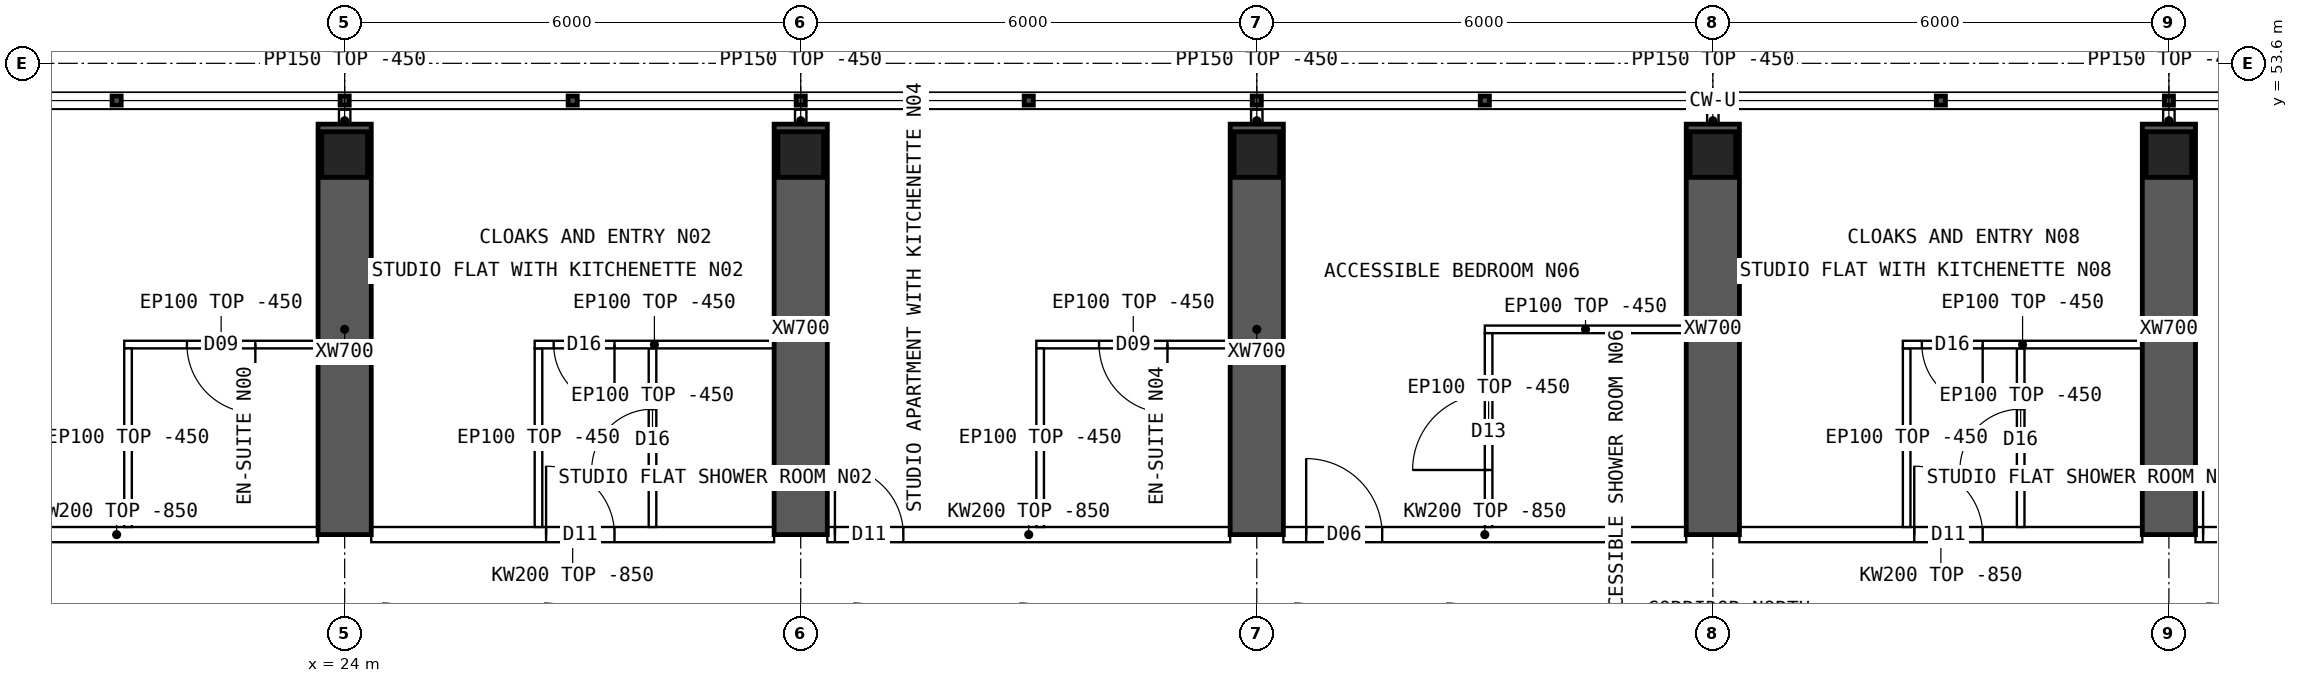
"""IFC4 building model, lengths in metres.
Left out: names, types, materials, properties, quantities, classifications, styles, units other than length and angle.
Written with IfcOpenShell. Run it as: python <this file> out.ifc"""

import sys

from ifc_helpers import new_model, si_unit, direction, frame, frame_2d, origin, origin_2d, place, context, subcontext, project, spatial, polyline, rectangle, hollow_rectangle, outline, extrude, element, fill, save


model = new_model("IFC4")
c1 = context("Model", 3, precision=1e-05, world=origin(), true_north=direction((0.0, 1.0)))
c2 = subcontext(c1, "Body", "Model", "MODEL_VIEW")
j1 = project(units=[si_unit("LENGTHUNIT", "METRE"), si_unit("PLANEANGLEUNIT", "RADIAN")], contexts=[c1])
p1 = place(None, origin())
s1 = spatial("IfcSite", under=j1, at=p1, CompositionType="ELEMENT")
p2 = place(p1, origin())
s2 = spatial("IfcBuilding", under=s1, at=p2, CompositionType="ELEMENT")
p3 = place(p2, frame((0.0, 0.0, 212.8)))
s3 = spatial("IfcBuildingStorey", under=s2, at=p3, CompositionType="ELEMENT", Elevation=212.8)
for number, where, z_axis, x_axis in (
    (1, (24.0, 52.4, 0.0), (0.0, 0.0, 1.0), (1.0, 0.0, 0.0)),
    (2, (30.0, 52.4, 0.0), (0.0, 0.0, 1.0), (1.0, 0.0, 0.0)),
    (3, (36.0, 52.4, 0.0), (0.0, 0.0, 1.0), (1.0, 0.0, 0.0)),
    (4, (42.0, 52.4, 0.0), (0.0, 0.0, 1.0), (1.0, 0.0, 0.0)),
    (5, (48.0, 52.4, 0.0), (0.0, 0.0, 1.0), (1.0, 0.0, 0.0)),
):
    element("IfcColumn", number, at=place(p3, frame(where, z_axis=z_axis, x_axis=x_axis)), inside=s3, PredefinedType="COLUMN", context=c2, shape_type="SweptSolid", body=[
        extrude(hollow_rectangle(XDim=0.6, YDim=0.6, WallThickness=0.06, at=origin_2d()), origin(), (0.0, 0.0, 1.0), 3.75),
    ])
for number, where, z_axis, x_axis in (
    (6, (24.0, 47.4, 0.0), (0.0, 0.0, 1.0), (0.0, 1.0, 0.0)),
    (7, (30.0, 47.4, 0.0), (0.0, 0.0, 1.0), (0.0, 1.0, 0.0)),
    (8, (36.0, 47.4, 0.0), (0.0, 0.0, 1.0), (0.0, 1.0, 0.0)),
    (9, (42.0, 47.4, 0.0), (0.0, 0.0, 1.0), (0.0, 1.0, 0.0)),
    (10, (48.0, 47.4, 0.0), (0.0, 0.0, 1.0), (0.0, 1.0, 0.0)),
):
    element("IfcWall", number, at=place(p3, frame(where, z_axis=z_axis, x_axis=x_axis)), inside=s3, PredefinedType="SHEAR", context=c2, shape_type="SweptSolid", body=[
        extrude(rectangle(XDim=5.4, YDim=0.7, at=frame_2d((2.7, 0.0))), origin(), (0.0, 0.0, 1.0), 3.75),
    ])
p4 = place(p3, frame((18.35, 47.4, 0.0), z_axis=(0.0, 0.0, 1.0), x_axis=(1.0, 0.0, 0.0)))
e11 = element("IfcWall", 11, at=p4, inside=s3, PredefinedType="SOLIDWALL", context=c2, shape_type="SweptSolid", body=[
    extrude(outline(polyline([(0.0, 0.0), (5.3, 0.0), (5.3, 2.9), (0.0, 2.9), (0.0, 0.0)])), frame((0.0, 0.1, 0.0), z_axis=(0.0, -1.0, 0.0), x_axis=(1.0, 0.0, 0.0)), (0.0, 0.0, 1.0), 0.2),
])
p5 = place(p4, frame((0.1, 0.0, 0.0)))
e12 = element("IfcOpeningElement", 12, at=p5, cuts=e11, PredefinedType="OPENING", context=c2, shape_type="SweptSolid", body=[
    extrude(rectangle(XDim=0.9, YDim=2.1, at=frame_2d((0.45, 1.05))), frame((0.0, 0.11, 0.0), z_axis=(0.0, -1.0, 0.0), x_axis=(1.0, 0.0, 0.0)), (0.0, 0.0, 1.0), 0.22),
])
p6 = place(p3, frame((24.35, 47.4, 0.0), z_axis=(0.0, 0.0, 1.0), x_axis=(1.0, 0.0, 0.0)))
e13 = element("IfcWall", 13, at=p6, inside=s3, PredefinedType="SOLIDWALL", context=c2, shape_type="SweptSolid", body=[
    extrude(outline(polyline([(0.0, 0.0), (5.3, 0.0), (5.3, 2.9), (0.0, 2.9), (0.0, 0.0)])), frame((0.0, 0.1, 0.0), z_axis=(0.0, -1.0, 0.0), x_axis=(1.0, 0.0, 0.0)), (0.0, 0.0, 1.0), 0.2),
])
p7 = place(p6, frame((2.3, 0.0, 0.0)))
e14 = element("IfcOpeningElement", 14, at=p7, cuts=e13, PredefinedType="OPENING", context=c2, shape_type="SweptSolid", body=[
    extrude(rectangle(XDim=0.9, YDim=2.1, at=frame_2d((0.45, 1.05))), frame((0.0, 0.11, 0.0), z_axis=(0.0, -1.0, 0.0), x_axis=(1.0, 0.0, 0.0)), (0.0, 0.0, 1.0), 0.22),
])
p8 = place(p3, frame((30.35, 47.4, 0.0), z_axis=(0.0, 0.0, 1.0), x_axis=(1.0, 0.0, 0.0)))
e15 = element("IfcWall", 15, at=p8, inside=s3, PredefinedType="SOLIDWALL", context=c2, shape_type="SweptSolid", body=[
    extrude(outline(polyline([(0.0, 0.0), (5.3, 0.0), (5.3, 2.9), (0.0, 2.9), (0.0, 0.0)])), frame((0.0, 0.1, 0.0), z_axis=(0.0, -1.0, 0.0), x_axis=(1.0, 0.0, 0.0)), (0.0, 0.0, 1.0), 0.2),
])
p9 = place(p8, frame((0.1, 0.0, 0.0)))
e16 = element("IfcOpeningElement", 16, at=p9, cuts=e15, PredefinedType="OPENING", context=c2, shape_type="SweptSolid", body=[
    extrude(rectangle(XDim=0.9, YDim=2.1, at=frame_2d((0.45, 1.05))), frame((0.0, 0.11, 0.0), z_axis=(0.0, -1.0, 0.0), x_axis=(1.0, 0.0, 0.0)), (0.0, 0.0, 1.0), 0.22),
])
p10 = place(p3, frame((36.35, 47.4, 0.0), z_axis=(0.0, 0.0, 1.0), x_axis=(1.0, 0.0, 0.0)))
e17 = element("IfcWall", 17, at=p10, inside=s3, PredefinedType="SOLIDWALL", context=c2, shape_type="SweptSolid", body=[
    extrude(outline(polyline([(0.0, 0.0), (5.3, 0.0), (5.3, 2.9), (0.0, 2.9), (0.0, 0.0)])), frame((0.0, 0.1, 0.0), z_axis=(0.0, -1.0, 0.0), x_axis=(1.0, 0.0, 0.0)), (0.0, 0.0, 1.0), 0.2),
])
p11 = place(p10, frame((0.3, 0.0, 0.0)))
e18 = element("IfcOpeningElement", 18, at=p11, cuts=e17, PredefinedType="OPENING", context=c2, shape_type="SweptSolid", body=[
    extrude(rectangle(XDim=1.0, YDim=2.1, at=frame_2d((0.5, 1.05))), frame((0.0, 0.11, 0.0), z_axis=(0.0, -1.0, 0.0), x_axis=(1.0, 0.0, 0.0)), (0.0, 0.0, 1.0), 0.22),
])
p12 = place(p3, frame((42.35, 47.4, 0.0), z_axis=(0.0, 0.0, 1.0), x_axis=(1.0, 0.0, 0.0)))
e19 = element("IfcWall", 19, at=p12, inside=s3, PredefinedType="SOLIDWALL", context=c2, shape_type="SweptSolid", body=[
    extrude(outline(polyline([(0.0, 0.0), (5.3, 0.0), (5.3, 2.9), (0.0, 2.9), (0.0, 0.0)])), frame((0.0, 0.1, 0.0), z_axis=(0.0, -1.0, 0.0), x_axis=(1.0, 0.0, 0.0)), (0.0, 0.0, 1.0), 0.2),
])
p13 = place(p12, frame((2.3, 0.0, 0.0)))
e20 = element("IfcOpeningElement", 20, at=p13, cuts=e19, PredefinedType="OPENING", context=c2, shape_type="SweptSolid", body=[
    extrude(rectangle(XDim=0.9, YDim=2.1, at=frame_2d((0.45, 1.05))), frame((0.0, 0.11, 0.0), z_axis=(0.0, -1.0, 0.0), x_axis=(1.0, 0.0, 0.0)), (0.0, 0.0, 1.0), 0.22),
])
p14 = place(p3, frame((48.35, 47.4, 0.0), z_axis=(0.0, 0.0, 1.0), x_axis=(1.0, 0.0, 0.0)))
e21 = element("IfcWall", 21, at=p14, inside=s3, PredefinedType="SOLIDWALL", context=c2, shape_type="SweptSolid", body=[
    extrude(outline(polyline([(0.0, 0.0), (5.3, 0.0), (5.3, 2.9), (0.0, 2.9), (0.0, 0.0)])), frame((0.0, 0.1, 0.0), z_axis=(0.0, -1.0, 0.0), x_axis=(1.0, 0.0, 0.0)), (0.0, 0.0, 1.0), 0.2),
])
p15 = place(p14, frame((0.1, 0.0, 0.0)))
e22 = element("IfcOpeningElement", 22, at=p15, cuts=e21, PredefinedType="OPENING", context=c2, shape_type="SweptSolid", body=[
    extrude(rectangle(XDim=0.9, YDim=2.1, at=frame_2d((0.45, 1.05))), frame((0.0, 0.11, 0.0), z_axis=(0.0, -1.0, 0.0), x_axis=(1.0, 0.0, 0.0)), (0.0, 0.0, 1.0), 0.22),
])
p16 = place(p3, frame((21.1, 49.9, 0.0), z_axis=(0.0, 0.0, 1.0), x_axis=(1.0, 0.0, 0.0)))
e23 = element("IfcWall", 23, at=p16, inside=s3, PredefinedType="PARTITIONING", context=c2, shape_type="SweptSolid", body=[
    extrude(rectangle(XDim=2.55, YDim=0.1, at=frame_2d((1.275, 0.0))), origin(), (0.0, 0.0, 1.0), 3.3),
])
p17 = place(p16, frame((0.825, 0.0, 0.0)))
e24 = element("IfcOpeningElement", 24, at=p17, cuts=e23, PredefinedType="OPENING", context=c2, shape_type="SweptSolid", body=[
    extrude(rectangle(XDim=0.9, YDim=2.1, at=frame_2d((0.45, 1.05))), frame((0.0, 0.06, 0.0), z_axis=(0.0, -1.0, 0.0), x_axis=(1.0, 0.0, 0.0)), (0.0, 0.0, 1.0), 0.12),
])
p18 = place(p3, frame((21.15, 49.85, 0.0), z_axis=(0.0, 0.0, 1.0), x_axis=(0.0, -1.0, 0.0)))
e25 = element("IfcWall", 25, at=p18, inside=s3, PredefinedType="PARTITIONING", context=c2, shape_type="SweptSolid", body=[
    extrude(outline(polyline([(0.0, 0.0), (2.35, 0.0), (2.35, 2.9), (2.302, 2.9), (2.3, 3.3), (0.0, 3.3), (0.0, 0.0)])), frame((0.0, 0.05, 0.0), z_axis=(0.0, -1.0, 0.0), x_axis=(1.0, 0.0, 0.0)), (0.0, 0.0, 1.0), 0.1),
])
p19 = place(p3, frame((26.5, 49.9, 0.0), z_axis=(0.0, 0.0, 1.0), x_axis=(1.0, 0.0, 0.0)))
e26 = element("IfcWall", 26, at=p19, inside=s3, PredefinedType="PARTITIONING", context=c2, shape_type="SweptSolid", body=[
    extrude(rectangle(XDim=3.15, YDim=0.1, at=frame_2d((1.575, 0.0))), origin(), (0.0, 0.0, 1.0), 3.3),
])
p20 = place(p19, frame((0.25, 0.0, 0.0)))
e27 = element("IfcOpeningElement", 27, at=p20, cuts=e26, PredefinedType="OPENING", context=c2, shape_type="SweptSolid", body=[
    extrude(rectangle(XDim=0.8, YDim=2.1, at=frame_2d((0.4, 1.05))), frame((0.0, 0.06, 0.0), z_axis=(0.0, -1.0, 0.0), x_axis=(1.0, 0.0, 0.0)), (0.0, 0.0, 1.0), 0.12),
])
p21 = place(p3, frame((26.55, 49.85, 0.0), z_axis=(0.0, 0.0, 1.0), x_axis=(0.0, -1.0, 0.0)))
e28 = element("IfcWall", 28, at=p21, inside=s3, PredefinedType="PARTITIONING", context=c2, shape_type="SweptSolid", body=[
    extrude(outline(polyline([(0.0, 0.0), (2.35, 0.0), (2.35, 2.9), (2.302, 2.9), (2.3, 3.3), (0.0, 3.3), (0.0, 0.0)])), frame((0.0, 0.05, 0.0), z_axis=(0.0, -1.0, 0.0), x_axis=(1.0, 0.0, 0.0)), (0.0, 0.0, 1.0), 0.1),
])
p22 = place(p3, frame((28.05, 49.85, 0.0), z_axis=(0.0, 0.0, 1.0), x_axis=(0.0, -1.0, 0.0)))
e29 = element("IfcWall", 29, at=p22, inside=s3, PredefinedType="PARTITIONING", context=c2, shape_type="SweptSolid", body=[
    extrude(outline(polyline([(0.0, 0.0), (2.35, 0.0), (2.35, 2.9), (2.302, 2.9), (2.3, 3.3), (0.0, 3.3), (0.0, 0.0)])), frame((0.0, 0.05, 0.0), z_axis=(0.0, -1.0, 0.0), x_axis=(1.0, 0.0, 0.0)), (0.0, 0.0, 1.0), 0.1),
])
p23 = place(p22, frame((0.8, 0.0, 0.0)))
e30 = element("IfcOpeningElement", 30, at=p23, cuts=e29, PredefinedType="OPENING", context=c2, shape_type="SweptSolid", body=[
    extrude(rectangle(XDim=0.8, YDim=2.1, at=frame_2d((0.4, 1.05))), frame((0.0, 0.06, 0.0), z_axis=(0.0, -1.0, 0.0), x_axis=(1.0, 0.0, 0.0)), (0.0, 0.0, 1.0), 0.12),
])
p24 = place(p3, frame((33.1, 49.9, 0.0), z_axis=(0.0, 0.0, 1.0), x_axis=(1.0, 0.0, 0.0)))
e31 = element("IfcWall", 31, at=p24, inside=s3, PredefinedType="PARTITIONING", context=c2, shape_type="SweptSolid", body=[
    extrude(rectangle(XDim=2.55, YDim=0.1, at=frame_2d((1.275, 0.0))), origin(), (0.0, 0.0, 1.0), 3.3),
])
p25 = place(p24, frame((0.825, 0.0, 0.0)))
e32 = element("IfcOpeningElement", 32, at=p25, cuts=e31, PredefinedType="OPENING", context=c2, shape_type="SweptSolid", body=[
    extrude(rectangle(XDim=0.9, YDim=2.1, at=frame_2d((0.45, 1.05))), frame((0.0, 0.06, 0.0), z_axis=(0.0, -1.0, 0.0), x_axis=(1.0, 0.0, 0.0)), (0.0, 0.0, 1.0), 0.12),
])
p26 = place(p3, frame((33.15, 49.85, 0.0), z_axis=(0.0, 0.0, 1.0), x_axis=(0.0, -1.0, 0.0)))
e33 = element("IfcWall", 33, at=p26, inside=s3, PredefinedType="PARTITIONING", context=c2, shape_type="SweptSolid", body=[
    extrude(outline(polyline([(0.0, 0.0), (2.35, 0.0), (2.35, 2.9), (2.302, 2.9), (2.3, 3.3), (0.0, 3.3), (0.0, 0.0)])), frame((0.0, 0.05, 0.0), z_axis=(0.0, -1.0, 0.0), x_axis=(1.0, 0.0, 0.0)), (0.0, 0.0, 1.0), 0.1),
])
p27 = place(p3, frame((39.0, 50.1, 0.0), z_axis=(0.0, 0.0, 1.0), x_axis=(1.0, 0.0, 0.0)))
e34 = element("IfcWall", 34, at=p27, inside=s3, PredefinedType="PARTITIONING", context=c2, shape_type="SweptSolid", body=[
    extrude(rectangle(XDim=2.65, YDim=0.1, at=frame_2d((1.325, 0.0))), origin(), (0.0, 0.0, 1.0), 3.3),
])
p28 = place(p3, frame((39.05, 50.05, 0.0), z_axis=(0.0, 0.0, 1.0), x_axis=(0.0, -1.0, 0.0)))
e35 = element("IfcWall", 35, at=p28, inside=s3, PredefinedType="PARTITIONING", context=c2, shape_type="SweptSolid", body=[
    extrude(outline(polyline([(0.0, 0.0), (2.55, 0.0), (2.55, 2.9), (2.502, 2.9), (2.5, 3.3), (0.0, 3.3), (0.0, 0.0)])), frame((0.0, 0.05, 0.0), z_axis=(0.0, -1.0, 0.0), x_axis=(1.0, 0.0, 0.0)), (0.0, 0.0, 1.0), 0.1),
])
p29 = place(p28, frame((0.8, 0.0, 0.0)))
e36 = element("IfcOpeningElement", 36, at=p29, cuts=e35, PredefinedType="OPENING", context=c2, shape_type="SweptSolid", body=[
    extrude(rectangle(XDim=1.0, YDim=2.1, at=frame_2d((0.5, 1.05))), frame((0.0, 0.06, 0.0), z_axis=(0.0, -1.0, 0.0), x_axis=(1.0, 0.0, 0.0)), (0.0, 0.0, 1.0), 0.12),
])
p30 = place(p3, frame((44.5, 49.9, 0.0), z_axis=(0.0, 0.0, 1.0), x_axis=(1.0, 0.0, 0.0)))
e37 = element("IfcWall", 37, at=p30, inside=s3, PredefinedType="PARTITIONING", context=c2, shape_type="SweptSolid", body=[
    extrude(rectangle(XDim=3.15, YDim=0.1, at=frame_2d((1.575, 0.0))), origin(), (0.0, 0.0, 1.0), 3.3),
])
p31 = place(p30, frame((0.25, 0.0, 0.0)))
e38 = element("IfcOpeningElement", 38, at=p31, cuts=e37, PredefinedType="OPENING", context=c2, shape_type="SweptSolid", body=[
    extrude(rectangle(XDim=0.8, YDim=2.1, at=frame_2d((0.4, 1.05))), frame((0.0, 0.06, 0.0), z_axis=(0.0, -1.0, 0.0), x_axis=(1.0, 0.0, 0.0)), (0.0, 0.0, 1.0), 0.12),
])
p32 = place(p3, frame((44.55, 49.85, 0.0), z_axis=(0.0, 0.0, 1.0), x_axis=(0.0, -1.0, 0.0)))
e39 = element("IfcWall", 39, at=p32, inside=s3, PredefinedType="PARTITIONING", context=c2, shape_type="SweptSolid", body=[
    extrude(outline(polyline([(0.0, 0.0), (2.35, 0.0), (2.35, 2.9), (2.302, 2.9), (2.3, 3.3), (0.0, 3.3), (0.0, 0.0)])), frame((0.0, 0.05, 0.0), z_axis=(0.0, -1.0, 0.0), x_axis=(1.0, 0.0, 0.0)), (0.0, 0.0, 1.0), 0.1),
])
p33 = place(p3, frame((46.05, 49.85, 0.0), z_axis=(0.0, 0.0, 1.0), x_axis=(0.0, -1.0, 0.0)))
e40 = element("IfcWall", 40, at=p33, inside=s3, PredefinedType="PARTITIONING", context=c2, shape_type="SweptSolid", body=[
    extrude(outline(polyline([(0.0, 0.0), (2.35, 0.0), (2.35, 2.9), (2.302, 2.9), (2.3, 3.3), (0.0, 3.3), (0.0, 0.0)])), frame((0.0, 0.05, 0.0), z_axis=(0.0, -1.0, 0.0), x_axis=(1.0, 0.0, 0.0)), (0.0, 0.0, 1.0), 0.1),
])
p34 = place(p33, frame((0.8, 0.0, 0.0)))
e41 = element("IfcOpeningElement", 41, at=p34, cuts=e40, PredefinedType="OPENING", context=c2, shape_type="SweptSolid", body=[
    extrude(rectangle(XDim=0.8, YDim=2.1, at=frame_2d((0.4, 1.05))), frame((0.0, 0.06, 0.0), z_axis=(0.0, -1.0, 0.0), x_axis=(1.0, 0.0, 0.0)), (0.0, 0.0, 1.0), 0.12),
])
for number, where, z_axis, x_axis in (
    (42, (24.0, 52.7, 0.0), (0.0, 0.0, 1.0), (0.0, 1.0, 0.0)),
    (43, (30.0, 52.7, 0.0), (0.0, 0.0, 1.0), (0.0, 1.0, 0.0)),
    (44, (36.0, 52.7, 0.0), (0.0, 0.0, 1.0), (0.0, 1.0, 0.0)),
    (45, (42.0, 52.7, 0.0), (0.0, 0.0, 1.0), (0.0, 1.0, 0.0)),
    (46, (48.0, 52.7, 0.0), (0.0, 0.0, 1.0), (0.0, 1.0, 0.0)),
):
    element("IfcWall", number, at=place(p3, frame(where, z_axis=z_axis, x_axis=x_axis)), inside=s3, PredefinedType="PARTITIONING", context=c2, shape_type="SweptSolid", body=[
        extrude(rectangle(XDim=0.29, YDim=0.15, at=frame_2d((0.145, 0.0))), origin(), (0.0, 0.0, 1.0), 3.3),
    ])
p35 = place(p17, origin())
e47 = element("IfcDoor", 47, at=p35, inside=s3, OperationType="SINGLE_SWING_RIGHT", PredefinedType="DOOR", context=c2, shape_type="SweptSolid", body=[
    extrude(rectangle(XDim=0.9, YDim=2.1, at=frame_2d((0.45, 1.05))), frame((0.0, 0.025, 0.0), z_axis=(0.0, -1.0, 0.0), x_axis=(1.0, 0.0, 0.0)), (0.0, 0.0, 1.0), 0.05),
])
fill(e24, e47)
p36 = place(p20, origin())
e48 = element("IfcDoor", 48, at=p36, inside=s3, OperationType="SINGLE_SWING_RIGHT", PredefinedType="DOOR", context=c2, shape_type="SweptSolid", body=[
    extrude(rectangle(XDim=0.8, YDim=2.1, at=frame_2d((0.4, 1.05))), frame((0.0, 0.025, 0.0), z_axis=(0.0, -1.0, 0.0), x_axis=(1.0, 0.0, 0.0)), (0.0, 0.0, 1.0), 0.05),
])
fill(e27, e48)
p37 = place(p23, origin())
e49 = element("IfcDoor", 49, at=p37, inside=s3, OperationType="SINGLE_SWING_RIGHT", PredefinedType="DOOR", context=c2, shape_type="SweptSolid", body=[
    extrude(rectangle(XDim=0.8, YDim=2.1, at=frame_2d((0.4, 1.05))), frame((0.0, 0.025, 0.0), z_axis=(0.0, -1.0, 0.0), x_axis=(1.0, 0.0, 0.0)), (0.0, 0.0, 1.0), 0.05),
])
fill(e30, e49)
p38 = place(p7, origin())
e50 = element("IfcDoor", 50, at=p38, inside=s3, OperationType="SINGLE_SWING_LEFT", PredefinedType="DOOR", context=c2, shape_type="SweptSolid", body=[
    extrude(rectangle(XDim=0.9, YDim=2.1, at=frame_2d((0.45, 1.05))), frame((0.0, 0.025, 0.0), z_axis=(0.0, -1.0, 0.0), x_axis=(1.0, 0.0, 0.0)), (0.0, 0.0, 1.0), 0.05),
])
fill(e14, e50)
p39 = place(p25, origin())
e51 = element("IfcDoor", 51, at=p39, inside=s3, OperationType="SINGLE_SWING_RIGHT", PredefinedType="DOOR", context=c2, shape_type="SweptSolid", body=[
    extrude(rectangle(XDim=0.9, YDim=2.1, at=frame_2d((0.45, 1.05))), frame((0.0, 0.025, 0.0), z_axis=(0.0, -1.0, 0.0), x_axis=(1.0, 0.0, 0.0)), (0.0, 0.0, 1.0), 0.05),
])
fill(e32, e51)
p40 = place(p9, origin())
e52 = element("IfcDoor", 52, at=p40, inside=s3, OperationType="SINGLE_SWING_LEFT", PredefinedType="DOOR", context=c2, shape_type="SweptSolid", body=[
    extrude(rectangle(XDim=0.9, YDim=2.1, at=frame_2d((0.45, 1.05))), frame((0.0, 0.025, 0.0), z_axis=(0.0, -1.0, 0.0), x_axis=(1.0, 0.0, 0.0)), (0.0, 0.0, 1.0), 0.05),
])
fill(e16, e52)
p41 = place(p29, origin())
e53 = element("IfcDoor", 53, at=p41, inside=s3, OperationType="SINGLE_SWING_RIGHT", PredefinedType="DOOR", context=c2, shape_type="SweptSolid", body=[
    extrude(rectangle(XDim=1.0, YDim=2.1, at=frame_2d((0.5, 1.05))), frame((0.0, 0.025, 0.0), z_axis=(0.0, -1.0, 0.0), x_axis=(1.0, 0.0, 0.0)), (0.0, 0.0, 1.0), 0.05),
])
fill(e36, e53)
p42 = place(p11, origin())
e54 = element("IfcDoor", 54, at=p42, inside=s3, OperationType="SINGLE_SWING_LEFT", PredefinedType="DOOR", context=c2, shape_type="SweptSolid", body=[
    extrude(rectangle(XDim=1.0, YDim=2.1, at=frame_2d((0.5, 1.05))), frame((0.0, 0.025, 0.0), z_axis=(0.0, -1.0, 0.0), x_axis=(1.0, 0.0, 0.0)), (0.0, 0.0, 1.0), 0.05),
])
fill(e18, e54)
p43 = place(p31, origin())
e55 = element("IfcDoor", 55, at=p43, inside=s3, OperationType="SINGLE_SWING_RIGHT", PredefinedType="DOOR", context=c2, shape_type="SweptSolid", body=[
    extrude(rectangle(XDim=0.8, YDim=2.1, at=frame_2d((0.4, 1.05))), frame((0.0, 0.025, 0.0), z_axis=(0.0, -1.0, 0.0), x_axis=(1.0, 0.0, 0.0)), (0.0, 0.0, 1.0), 0.05),
])
fill(e38, e55)
p44 = place(p34, origin())
e56 = element("IfcDoor", 56, at=p44, inside=s3, OperationType="SINGLE_SWING_RIGHT", PredefinedType="DOOR", context=c2, shape_type="SweptSolid", body=[
    extrude(rectangle(XDim=0.8, YDim=2.1, at=frame_2d((0.4, 1.05))), frame((0.0, 0.025, 0.0), z_axis=(0.0, -1.0, 0.0), x_axis=(1.0, 0.0, 0.0)), (0.0, 0.0, 1.0), 0.05),
])
fill(e41, e56)
p45 = place(p13, origin())
e57 = element("IfcDoor", 57, at=p45, inside=s3, OperationType="SINGLE_SWING_LEFT", PredefinedType="DOOR", context=c2, shape_type="SweptSolid", body=[
    extrude(rectangle(XDim=0.9, YDim=2.1, at=frame_2d((0.45, 1.05))), frame((0.0, 0.025, 0.0), z_axis=(0.0, -1.0, 0.0), x_axis=(1.0, 0.0, 0.0)), (0.0, 0.0, 1.0), 0.05),
])
fill(e20, e57)
p46 = place(p15, origin())
e58 = element("IfcDoor", 58, at=p46, inside=s3, OperationType="SINGLE_SWING_LEFT", PredefinedType="DOOR", context=c2, shape_type="SweptSolid", body=[
    extrude(rectangle(XDim=0.9, YDim=2.1, at=frame_2d((0.45, 1.05))), frame((0.0, 0.025, 0.0), z_axis=(0.0, -1.0, 0.0), x_axis=(1.0, 0.0, 0.0)), (0.0, 0.0, 1.0), 0.05),
])
fill(e22, e58)
save(model, sys.argv[1])
